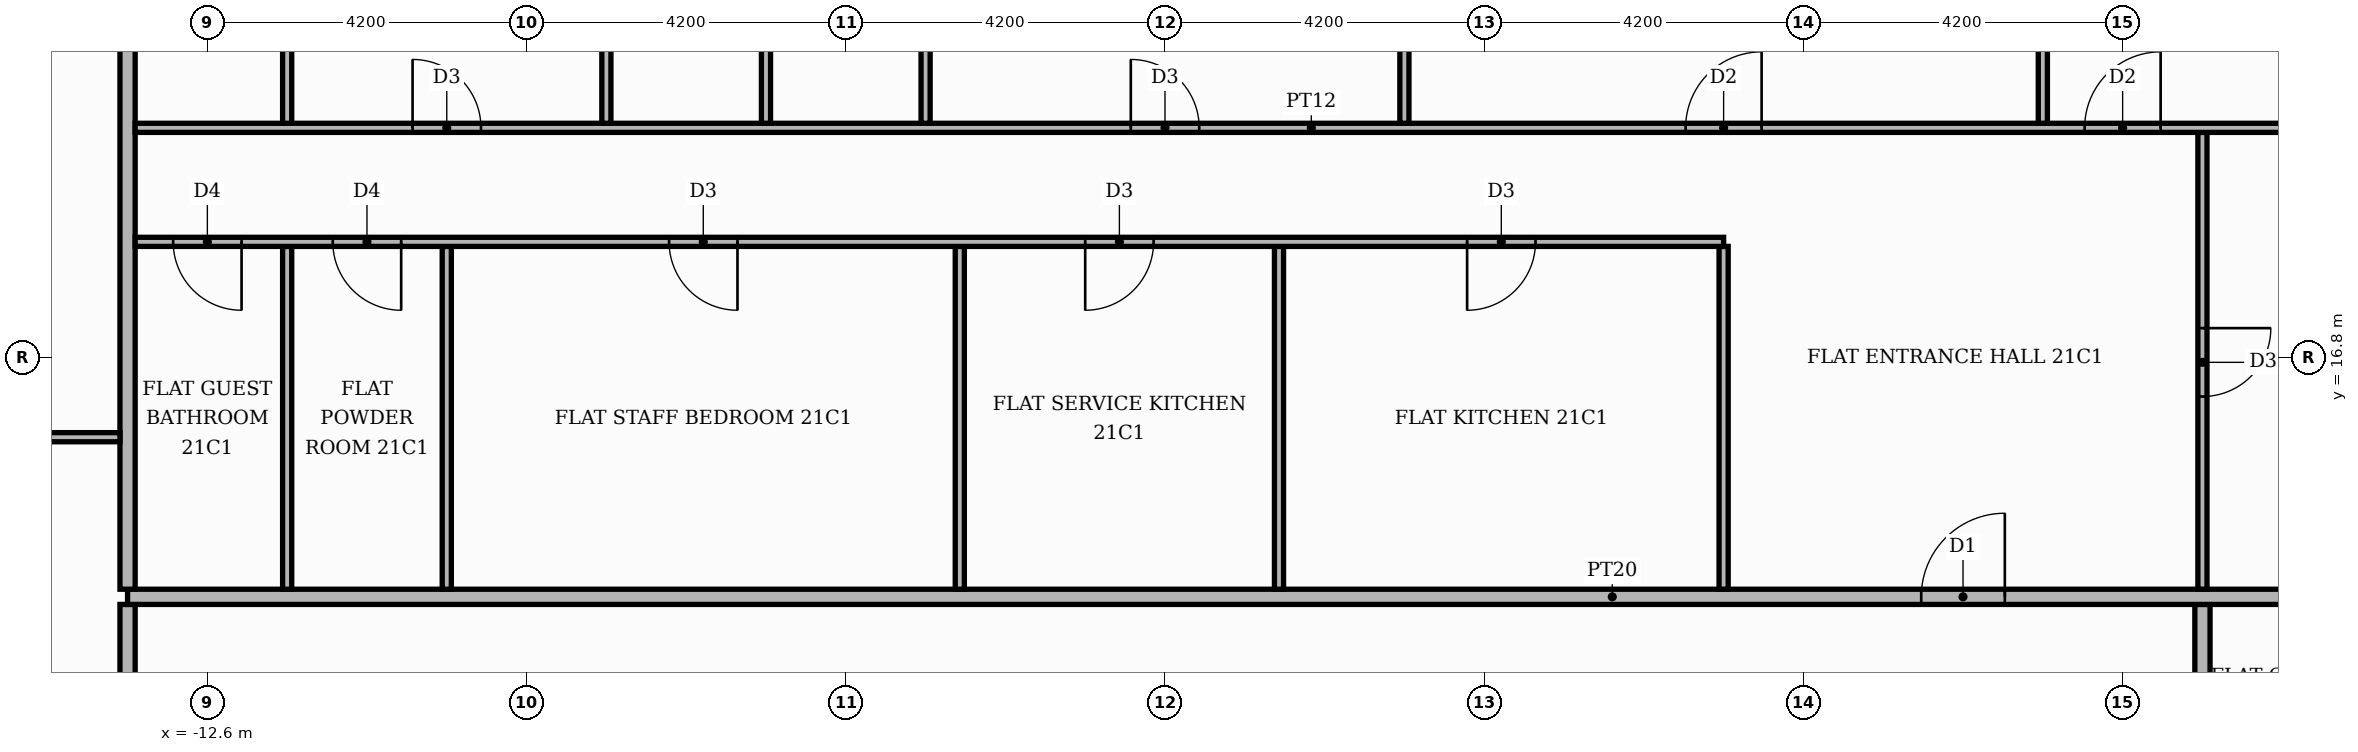
"""IFC4 building model, lengths in metres.
Left out: names, types, materials, properties, quantities, classifications, styles, units other than length and angle.
Written with IfcOpenShell. Run it as: python <this file> out.ifc"""

import sys

from ifc_helpers import new_model, si_unit, direction, frame, frame_2d, origin, place, context, subcontext, project, spatial, rectangle, extrude, element, fill, save


model = new_model("IFC4")
c1 = context("Model", 3, precision=1e-05, world=origin(), true_north=direction((0.0, 1.0)))
c2 = subcontext(c1, "Body", "Model", "MODEL_VIEW")
j1 = project(units=[si_unit("LENGTHUNIT", "METRE"), si_unit("PLANEANGLEUNIT", "RADIAN")], contexts=[c1])
p1 = place(None, origin())
s1 = spatial("IfcSite", under=j1, at=p1, CompositionType="ELEMENT")
p2 = place(p1, origin())
s2 = spatial("IfcBuilding", under=s1, at=p2, CompositionType="ELEMENT")
p3 = place(p2, frame((0.0, 0.0, 90.9)))
s3 = spatial("IfcBuildingStorey", under=s2, at=p3, CompositionType="ELEMENT", Elevation=90.9)
p4 = place(p3, frame((-13.65, -13.55, 0.0), z_axis=(0.0, 0.0, 1.0), x_axis=(0.0, 1.0, 0.0)))
e1 = element("IfcWall", 1, at=p4, inside=s3, PredefinedType="PARTITIONING", context=c2, shape_type="SweptSolid", body=[
    extrude(rectangle(XDim=27.1, YDim=0.2, at=frame_2d((13.55, 0.0))), origin(), (0.0, 0.0, 1.0), 3.48),
])
p5 = place(p4, frame((24.55, 0.0, 0.0)))
e2 = element("IfcOpeningElement", 2, at=p5, cuts=e1, PredefinedType="OPENING", context=c2, shape_type="SweptSolid", body=[
    extrude(rectangle(XDim=1.1, YDim=2.4, at=frame_2d((0.55, 1.2))), frame((0.0, 0.11, 0.0), z_axis=(0.0, -1.0, 0.0), x_axis=(1.0, 0.0, 0.0)), (0.0, 0.0, 1.0), 0.22),
])
p6 = place(p3, frame((13.65, -5.15, 0.0), z_axis=(0.0, 0.0, 1.0), x_axis=(0.0, 1.0, 0.0)))
e3 = element("IfcWall", 3, at=p6, inside=s3, PredefinedType="PARTITIONING", context=c2, shape_type="SweptSolid", body=[
    extrude(rectangle(XDim=18.7, YDim=0.2, at=frame_2d((9.35, 0.0))), origin(), (0.0, 0.0, 1.0), 3.48),
])
p7 = place(p6, frame((1.45, 0.0, 0.0)))
e4 = element("IfcOpeningElement", 4, at=p7, cuts=e3, PredefinedType="OPENING", context=c2, shape_type="SweptSolid", body=[
    extrude(rectangle(XDim=1.1, YDim=2.4, at=frame_2d((0.55, 1.2))), frame((0.0, 0.11, 0.0), z_axis=(0.0, -1.0, 0.0), x_axis=(1.0, 0.0, 0.0)), (0.0, 0.0, 1.0), 0.22),
])
p8 = place(p3, frame((-13.65, 13.65, 0.0), z_axis=(0.0, 0.0, 1.0), x_axis=(1.0, 0.0, 0.0)))
e5 = element("IfcWall", 5, at=p8, inside=s3, PredefinedType="PARTITIONING", context=c2, shape_type="SweptSolid", body=[
    extrude(rectangle(XDim=39.07, YDim=0.2, at=frame_2d((19.535, 0.0))), origin(), (0.0, 0.0, 1.0), 3.48),
])
p9 = place(p8, frame((23.6, 0.0, 0.0)))
e6 = element("IfcOpeningElement", 6, at=p9, cuts=e5, PredefinedType="OPENING", context=c2, shape_type="SweptSolid", body=[
    extrude(rectangle(XDim=1.1, YDim=2.4, at=frame_2d((0.55, 1.2))), frame((0.0, 0.11, 0.0), z_axis=(0.0, -1.0, 0.0), x_axis=(1.0, 0.0, 0.0)), (0.0, 0.0, 1.0), 0.22),
])
p10 = place(p3, frame((-13.65, 13.75, 0.0), z_axis=(0.0, 0.0, 1.0), x_axis=(0.0, 1.0, 0.0)))
e7 = element("IfcWall", 7, at=p10, inside=s3, PredefinedType="PARTITIONING", context=c2, shape_type="SweptSolid", body=[
    extrude(rectangle(XDim=11.67, YDim=0.2, at=frame_2d((5.835, 0.0))), origin(), (0.0, 0.0, 1.0), 3.48),
])
for number, where, z_axis, x_axis in (
    (8, (-11.55, 13.75, 0.0), (0.0, 0.0, 1.0), (0.0, 1.0, 0.0)),
    (9, (-9.45, 13.75, 0.0), (0.0, 0.0, 1.0), (0.0, 1.0, 0.0)),
    (10, (-2.7, 13.75, 0.0), (0.0, 0.0, 1.0), (0.0, 1.0, 0.0)),
    (11, (1.5, 13.75, 0.0), (0.0, 0.0, 1.0), (0.0, 1.0, 0.0)),
    (12, (7.35, 13.75, 0.0), (0.0, 0.0, 1.0), (0.0, 1.0, 0.0)),
):
    element("IfcWall", number, at=place(p3, frame(where, z_axis=z_axis, x_axis=x_axis)), inside=s3, PredefinedType="PARTITIONING", context=c2, shape_type="SweptSolid", body=[
        extrude(rectangle(XDim=4.51, YDim=0.12, at=frame_2d((2.255, 0.0))), origin(), (0.0, 0.0, 1.0), 3.48),
    ])
p11 = place(p3, frame((13.65, 13.75, 0.0), z_axis=(0.0, 0.0, 1.0), x_axis=(0.0, 1.0, 0.0)))
e13 = element("IfcWall", 13, at=p11, inside=s3, PredefinedType="PARTITIONING", context=c2, shape_type="SweptSolid", body=[
    extrude(rectangle(XDim=6.01, YDim=0.12, at=frame_2d((3.005, 0.0))), origin(), (0.0, 0.0, 1.0), 3.48),
])
p12 = place(p11, frame((2.535, 0.0, 0.0)))
e14 = element("IfcOpeningElement", 14, at=p12, cuts=e13, PredefinedType="OPENING", context=c2, shape_type="SweptSolid", body=[
    extrude(rectangle(XDim=0.9, YDim=2.1, at=frame_2d((0.45, 1.05))), frame((0.0, 0.07, 0.0), z_axis=(0.0, -1.0, 0.0), x_axis=(1.0, 0.0, 0.0)), (0.0, 0.0, 1.0), 0.14),
])
p13 = place(p3, frame((-19.82, 15.75, 0.0), z_axis=(0.0, 0.0, 1.0), x_axis=(1.0, 0.0, 0.0)))
e15 = element("IfcWall", 15, at=p13, inside=s3, PredefinedType="PARTITIONING", context=c2, shape_type="SweptSolid", body=[
    extrude(rectangle(XDim=6.07, YDim=0.12, at=frame_2d((3.035, 0.0))), origin(), (0.0, 0.0, 1.0), 3.48),
])
p14 = place(p13, frame((2.635, 0.0, 0.0)))
e16 = element("IfcOpeningElement", 16, at=p14, cuts=e15, PredefinedType="OPENING", context=c2, shape_type="SweptSolid", body=[
    extrude(rectangle(XDim=0.9, YDim=2.1, at=frame_2d((0.45, 1.05))), frame((0.0, 0.07, 0.0), z_axis=(0.0, -1.0, 0.0), x_axis=(1.0, 0.0, 0.0)), (0.0, 0.0, 1.0), 0.14),
])
p15 = place(p3, frame((-13.55, 18.32, 0.0), z_axis=(0.0, 0.0, 1.0), x_axis=(1.0, 0.0, 0.0)))
e17 = element("IfcWall", 17, at=p15, inside=s3, PredefinedType="PARTITIONING", context=c2, shape_type="SweptSolid", body=[
    extrude(rectangle(XDim=20.9, YDim=0.12, at=frame_2d((10.45, 0.0))), origin(), (0.0, 0.0, 1.0), 3.48),
])
p16 = place(p15, frame((17.525, 0.0, 0.0)))
e18 = element("IfcOpeningElement", 18, at=p16, cuts=e17, PredefinedType="OPENING", context=c2, shape_type="SweptSolid", body=[
    extrude(rectangle(XDim=0.9, YDim=2.1, at=frame_2d((0.45, 1.05))), frame((0.0, 0.07, 0.0), z_axis=(0.0, -1.0, 0.0), x_axis=(1.0, 0.0, 0.0)), (0.0, 0.0, 1.0), 0.14),
])
p17 = place(p15, frame((12.5, 0.0, 0.0)))
e19 = element("IfcOpeningElement", 19, at=p17, cuts=e17, PredefinedType="OPENING", context=c2, shape_type="SweptSolid", body=[
    extrude(rectangle(XDim=0.9, YDim=2.1, at=frame_2d((0.45, 1.05))), frame((0.0, 0.07, 0.0), z_axis=(0.0, -1.0, 0.0), x_axis=(1.0, 0.0, 0.0)), (0.0, 0.0, 1.0), 0.14),
])
p18 = place(p15, frame((7.025, 0.0, 0.0)))
e20 = element("IfcOpeningElement", 20, at=p18, cuts=e17, PredefinedType="OPENING", context=c2, shape_type="SweptSolid", body=[
    extrude(rectangle(XDim=0.9, YDim=2.1, at=frame_2d((0.45, 1.05))), frame((0.0, 0.07, 0.0), z_axis=(0.0, -1.0, 0.0), x_axis=(1.0, 0.0, 0.0)), (0.0, 0.0, 1.0), 0.14),
])
p19 = place(p15, frame((2.6, 0.0, 0.0)))
e21 = element("IfcOpeningElement", 21, at=p19, cuts=e17, PredefinedType="OPENING", context=c2, shape_type="SweptSolid", body=[
    extrude(rectangle(XDim=0.9, YDim=2.1, at=frame_2d((0.45, 1.05))), frame((0.0, 0.07, 0.0), z_axis=(0.0, -1.0, 0.0), x_axis=(1.0, 0.0, 0.0)), (0.0, 0.0, 1.0), 0.14),
])
p20 = place(p15, frame((0.5, 0.0, 0.0)))
e22 = element("IfcOpeningElement", 22, at=p20, cuts=e17, PredefinedType="OPENING", context=c2, shape_type="SweptSolid", body=[
    extrude(rectangle(XDim=0.9, YDim=2.1, at=frame_2d((0.45, 1.05))), frame((0.0, 0.07, 0.0), z_axis=(0.0, -1.0, 0.0), x_axis=(1.0, 0.0, 0.0)), (0.0, 0.0, 1.0), 0.14),
])
p21 = place(p3, frame((-13.55, 19.82, 0.0), z_axis=(0.0, 0.0, 1.0), x_axis=(1.0, 0.0, 0.0)))
e23 = element("IfcWall", 23, at=p21, inside=s3, PredefinedType="PARTITIONING", context=c2, shape_type="SweptSolid", body=[
    extrude(rectangle(XDim=30.95, YDim=0.12, at=frame_2d((15.475, 0.0))), origin(), (0.0, 0.0, 1.0), 3.48),
])
p22 = place(p21, frame((25.65, 0.0, 0.0)))
e24 = element("IfcOpeningElement", 24, at=p22, cuts=e23, PredefinedType="OPENING", context=c2, shape_type="SweptSolid", body=[
    extrude(rectangle(XDim=1.0, YDim=2.1, at=frame_2d((0.5, 1.05))), frame((0.0, 0.07, 0.0), z_axis=(0.0, -1.0, 0.0), x_axis=(1.0, 0.0, 0.0)), (0.0, 0.0, 1.0), 0.14),
])
p23 = place(p21, frame((20.4, 0.0, 0.0)))
e25 = element("IfcOpeningElement", 25, at=p23, cuts=e23, PredefinedType="OPENING", context=c2, shape_type="SweptSolid", body=[
    extrude(rectangle(XDim=1.0, YDim=2.1, at=frame_2d((0.5, 1.05))), frame((0.0, 0.07, 0.0), z_axis=(0.0, -1.0, 0.0), x_axis=(1.0, 0.0, 0.0)), (0.0, 0.0, 1.0), 0.14),
])
p24 = place(p21, frame((13.1, 0.0, 0.0)))
e26 = element("IfcOpeningElement", 26, at=p24, cuts=e23, PredefinedType="OPENING", context=c2, shape_type="SweptSolid", body=[
    extrude(rectangle(XDim=0.9, YDim=2.1, at=frame_2d((0.45, 1.05))), frame((0.0, 0.07, 0.0), z_axis=(0.0, -1.0, 0.0), x_axis=(1.0, 0.0, 0.0)), (0.0, 0.0, 1.0), 0.14),
])
p25 = place(p21, frame((3.65, 0.0, 0.0)))
e27 = element("IfcOpeningElement", 27, at=p25, cuts=e23, PredefinedType="OPENING", context=c2, shape_type="SweptSolid", body=[
    extrude(rectangle(XDim=0.9, YDim=2.1, at=frame_2d((0.45, 1.05))), frame((0.0, 0.07, 0.0), z_axis=(0.0, -1.0, 0.0), x_axis=(1.0, 0.0, 0.0)), (0.0, 0.0, 1.0), 0.14),
])
p26 = place(p3, frame((-11.55, 19.88, 0.0), z_axis=(0.0, 0.0, 1.0), x_axis=(0.0, 1.0, 0.0)))
e28 = element("IfcWall", 28, at=p26, inside=s3, PredefinedType="PARTITIONING", context=c2, shape_type="SweptSolid", body=[
    extrude(rectangle(XDim=5.54, YDim=0.12, at=frame_2d((2.77, 0.0))), origin(), (0.0, 0.0, 1.0), 3.48),
])
p27 = place(p26, frame((2.44, 0.0, 0.0)))
e29 = element("IfcOpeningElement", 29, at=p27, cuts=e28, PredefinedType="OPENING", context=c2, shape_type="SweptSolid", body=[
    extrude(rectangle(XDim=0.9, YDim=2.1, at=frame_2d((0.45, 1.05))), frame((0.0, 0.07, 0.0), z_axis=(0.0, -1.0, 0.0), x_axis=(1.0, 0.0, 0.0)), (0.0, 0.0, 1.0), 0.14),
])
p28 = place(p3, frame((-7.35, 19.88, 0.0), z_axis=(0.0, 0.0, 1.0), x_axis=(0.0, 1.0, 0.0)))
e30 = element("IfcWall", 30, at=p28, inside=s3, PredefinedType="PARTITIONING", context=c2, shape_type="SweptSolid", body=[
    extrude(rectangle(XDim=5.54, YDim=0.12, at=frame_2d((2.77, 0.0))), origin(), (0.0, 0.0, 1.0), 3.48),
])
p29 = place(p3, frame((-5.25, 19.88, 0.0), z_axis=(0.0, 0.0, 1.0), x_axis=(0.0, 1.0, 0.0)))
e31 = element("IfcWall", 31, at=p29, inside=s3, PredefinedType="PARTITIONING", context=c2, shape_type="SweptSolid", body=[
    extrude(rectangle(XDim=5.54, YDim=0.12, at=frame_2d((2.77, 0.0))), origin(), (0.0, 0.0, 1.0), 3.48),
])
p30 = place(p29, frame((2.44, 0.0, 0.0)))
e32 = element("IfcOpeningElement", 32, at=p30, cuts=e31, PredefinedType="OPENING", context=c2, shape_type="SweptSolid", body=[
    extrude(rectangle(XDim=0.9, YDim=2.1, at=frame_2d((0.45, 1.05))), frame((0.0, 0.07, 0.0), z_axis=(0.0, -1.0, 0.0), x_axis=(1.0, 0.0, 0.0)), (0.0, 0.0, 1.0), 0.14),
])
p31 = place(p3, frame((-3.15, 19.88, 0.0), z_axis=(0.0, 0.0, 1.0), x_axis=(0.0, 1.0, 0.0)))
e33 = element("IfcWall", 33, at=p31, inside=s3, PredefinedType="PARTITIONING", context=c2, shape_type="SweptSolid", body=[
    extrude(rectangle(XDim=5.54, YDim=0.12, at=frame_2d((2.77, 0.0))), origin(), (0.0, 0.0, 1.0), 3.48),
])
p32 = place(p31, frame((2.44, 0.0, 0.0)))
e34 = element("IfcOpeningElement", 34, at=p32, cuts=e33, PredefinedType="OPENING", context=c2, shape_type="SweptSolid", body=[
    extrude(rectangle(XDim=0.9, YDim=2.1, at=frame_2d((0.45, 1.05))), frame((0.0, 0.07, 0.0), z_axis=(0.0, -1.0, 0.0), x_axis=(1.0, 0.0, 0.0)), (0.0, 0.0, 1.0), 0.14),
])
for number, where, z_axis, x_axis in (
    (35, (3.15, 19.88, 0.0), (0.0, 0.0, 1.0), (0.0, 1.0, 0.0)),
    (36, (11.55, 19.88, 0.0), (0.0, 0.0, 1.0), (0.0, 1.0, 0.0)),
):
    element("IfcWall", number, at=place(p3, frame(where, z_axis=z_axis, x_axis=x_axis)), inside=s3, PredefinedType="PARTITIONING", context=c2, shape_type="SweptSolid", body=[
        extrude(rectangle(XDim=5.54, YDim=0.12, at=frame_2d((2.77, 0.0))), origin(), (0.0, 0.0, 1.0), 3.48),
    ])
p33 = place(p9, origin())
e37 = element("IfcDoor", 37, at=p33, inside=s3, OperationType="SINGLE_SWING_RIGHT", PredefinedType="DOOR", context=c2, shape_type="SweptSolid", body=[
    extrude(rectangle(XDim=1.1, YDim=2.4, at=frame_2d((0.55, 1.2))), frame((0.0, 0.025, 0.0), z_axis=(0.0, -1.0, 0.0), x_axis=(1.0, 0.0, 0.0)), (0.0, 0.0, 1.0), 0.05),
])
fill(e6, e37)
p34 = place(p12, frame((0.9, 0.0, 0.0), z_axis=(0.0, 0.0, 1.0), x_axis=(-1.0, 0.0, 0.0)))
e38 = element("IfcDoor", 38, at=p34, inside=s3, OperationType="SINGLE_SWING_RIGHT", PredefinedType="DOOR", context=c2, shape_type="SweptSolid", body=[
    extrude(rectangle(XDim=0.9, YDim=2.1, at=frame_2d((0.45, 1.05))), frame((0.0, 0.025, 0.0), z_axis=(0.0, -1.0, 0.0), x_axis=(1.0, 0.0, 0.0)), (0.0, 0.0, 1.0), 0.05),
])
fill(e14, e38)
p35 = place(p16, frame((0.9, 0.0, 0.0), z_axis=(0.0, 0.0, 1.0), x_axis=(-1.0, 0.0, 0.0)))
e39 = element("IfcDoor", 39, at=p35, inside=s3, OperationType="SINGLE_SWING_LEFT", PredefinedType="DOOR", context=c2, shape_type="SweptSolid", body=[
    extrude(rectangle(XDim=0.9, YDim=2.1, at=frame_2d((0.45, 1.05))), frame((0.0, 0.025, 0.0), z_axis=(0.0, -1.0, 0.0), x_axis=(1.0, 0.0, 0.0)), (0.0, 0.0, 1.0), 0.05),
])
fill(e18, e39)
p36 = place(p17, frame((0.9, 0.0, 0.0), z_axis=(0.0, 0.0, 1.0), x_axis=(-1.0, 0.0, 0.0)))
e40 = element("IfcDoor", 40, at=p36, inside=s3, OperationType="SINGLE_SWING_LEFT", PredefinedType="DOOR", context=c2, shape_type="SweptSolid", body=[
    extrude(rectangle(XDim=0.9, YDim=2.1, at=frame_2d((0.45, 1.05))), frame((0.0, 0.025, 0.0), z_axis=(0.0, -1.0, 0.0), x_axis=(1.0, 0.0, 0.0)), (0.0, 0.0, 1.0), 0.05),
])
fill(e19, e40)
p37 = place(p18, frame((0.9, 0.0, 0.0), z_axis=(0.0, 0.0, 1.0), x_axis=(-1.0, 0.0, 0.0)))
e41 = element("IfcDoor", 41, at=p37, inside=s3, OperationType="SINGLE_SWING_RIGHT", PredefinedType="DOOR", context=c2, shape_type="SweptSolid", body=[
    extrude(rectangle(XDim=0.9, YDim=2.1, at=frame_2d((0.45, 1.05))), frame((0.0, 0.025, 0.0), z_axis=(0.0, -1.0, 0.0), x_axis=(1.0, 0.0, 0.0)), (0.0, 0.0, 1.0), 0.05),
])
fill(e20, e41)
p38 = place(p19, frame((0.9, 0.0, 0.0), z_axis=(0.0, 0.0, 1.0), x_axis=(-1.0, 0.0, 0.0)))
e42 = element("IfcDoor", 42, at=p38, inside=s3, OperationType="SINGLE_SWING_RIGHT", PredefinedType="DOOR", context=c2, shape_type="SweptSolid", body=[
    extrude(rectangle(XDim=0.9, YDim=2.1, at=frame_2d((0.45, 1.05))), frame((0.0, 0.025, 0.0), z_axis=(0.0, -1.0, 0.0), x_axis=(1.0, 0.0, 0.0)), (0.0, 0.0, 1.0), 0.05),
])
fill(e21, e42)
p39 = place(p20, frame((0.9, 0.0, 0.0), z_axis=(0.0, 0.0, 1.0), x_axis=(-1.0, 0.0, 0.0)))
e43 = element("IfcDoor", 43, at=p39, inside=s3, OperationType="SINGLE_SWING_RIGHT", PredefinedType="DOOR", context=c2, shape_type="SweptSolid", body=[
    extrude(rectangle(XDim=0.9, YDim=2.1, at=frame_2d((0.45, 1.05))), frame((0.0, 0.025, 0.0), z_axis=(0.0, -1.0, 0.0), x_axis=(1.0, 0.0, 0.0)), (0.0, 0.0, 1.0), 0.05),
])
fill(e22, e43)
p40 = place(p22, origin())
e44 = element("IfcDoor", 44, at=p40, inside=s3, OperationType="SINGLE_SWING_RIGHT", PredefinedType="DOOR", context=c2, shape_type="SweptSolid", body=[
    extrude(rectangle(XDim=1.0, YDim=2.1, at=frame_2d((0.5, 1.05))), frame((0.0, 0.025, 0.0), z_axis=(0.0, -1.0, 0.0), x_axis=(1.0, 0.0, 0.0)), (0.0, 0.0, 1.0), 0.05),
])
fill(e24, e44)
p41 = place(p23, origin())
e45 = element("IfcDoor", 45, at=p41, inside=s3, OperationType="SINGLE_SWING_RIGHT", PredefinedType="DOOR", context=c2, shape_type="SweptSolid", body=[
    extrude(rectangle(XDim=1.0, YDim=2.1, at=frame_2d((0.5, 1.05))), frame((0.0, 0.025, 0.0), z_axis=(0.0, -1.0, 0.0), x_axis=(1.0, 0.0, 0.0)), (0.0, 0.0, 1.0), 0.05),
])
fill(e25, e45)
p42 = place(p24, origin())
e46 = element("IfcDoor", 46, at=p42, inside=s3, OperationType="SINGLE_SWING_LEFT", PredefinedType="DOOR", context=c2, shape_type="SweptSolid", body=[
    extrude(rectangle(XDim=0.9, YDim=2.1, at=frame_2d((0.45, 1.05))), frame((0.0, 0.025, 0.0), z_axis=(0.0, -1.0, 0.0), x_axis=(1.0, 0.0, 0.0)), (0.0, 0.0, 1.0), 0.05),
])
fill(e26, e46)
p43 = place(p25, origin())
e47 = element("IfcDoor", 47, at=p43, inside=s3, OperationType="SINGLE_SWING_LEFT", PredefinedType="DOOR", context=c2, shape_type="SweptSolid", body=[
    extrude(rectangle(XDim=0.9, YDim=2.1, at=frame_2d((0.45, 1.05))), frame((0.0, 0.025, 0.0), z_axis=(0.0, -1.0, 0.0), x_axis=(1.0, 0.0, 0.0)), (0.0, 0.0, 1.0), 0.05),
])
fill(e27, e47)
save(model, sys.argv[1])
